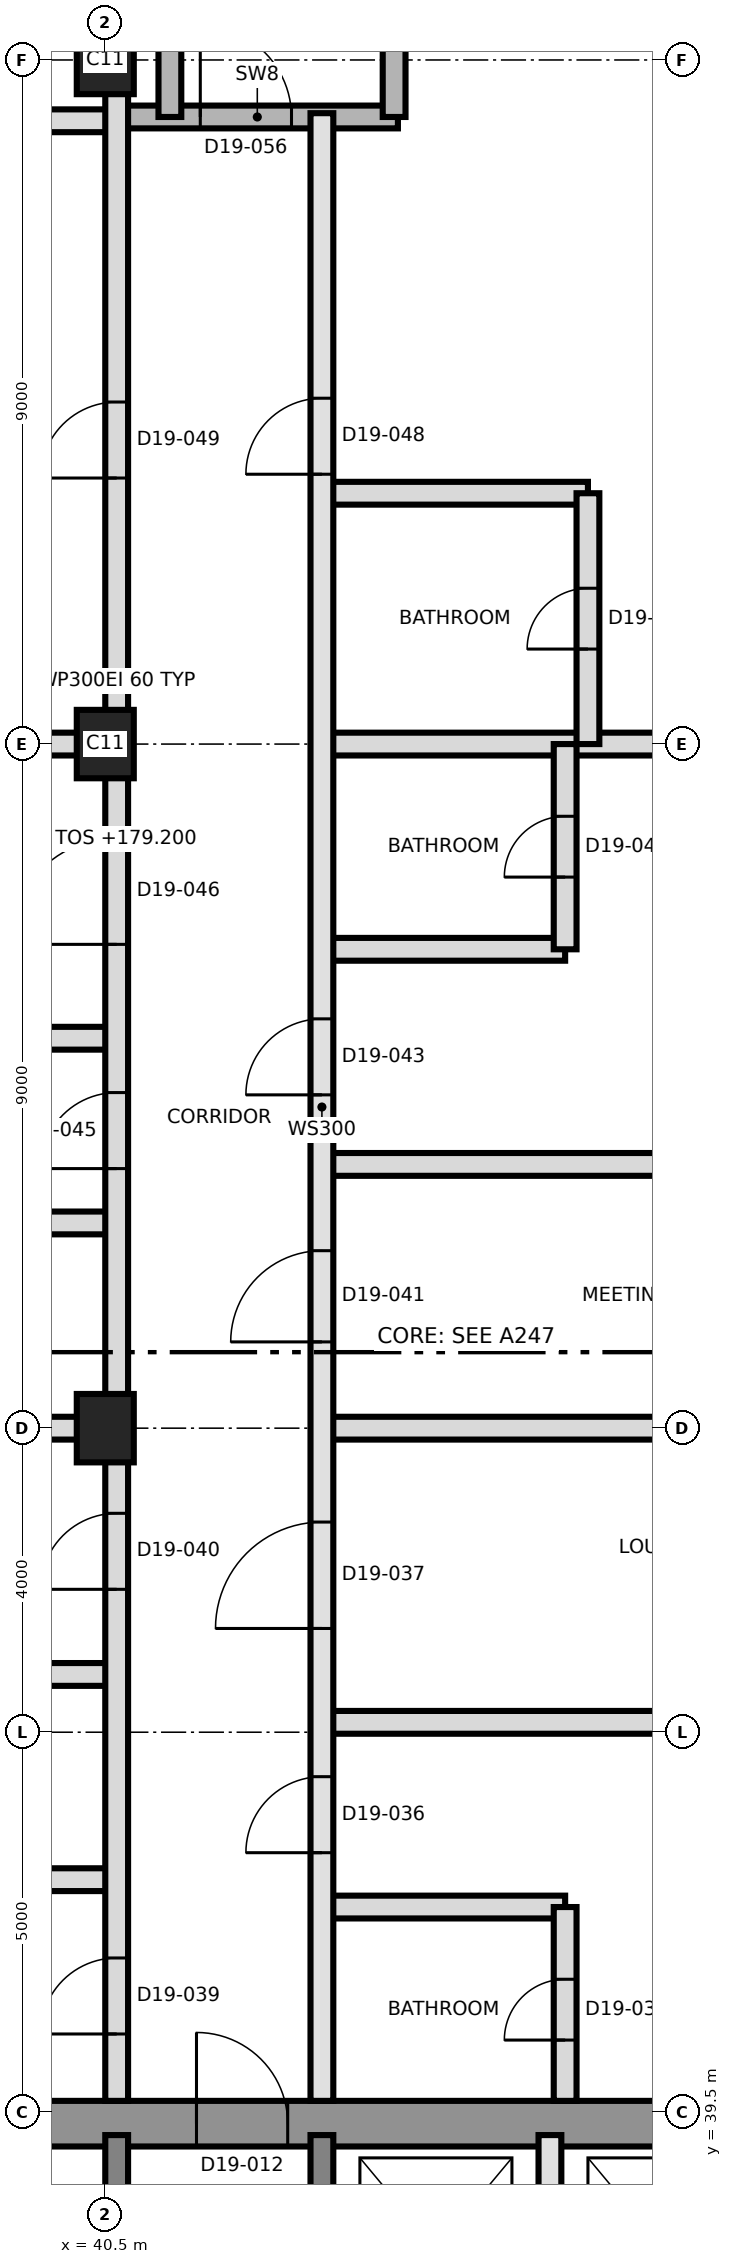
"""IFC4 building model, lengths in metres.
Left out: names, types, materials, properties, quantities, classifications, styles, units other than length and angle.
Written with IfcOpenShell. Run it as: python <this file> out.ifc"""

import sys

from ifc_helpers import new_model, si_unit, direction, frame, frame_2d, origin, origin_2d, place, context, subcontext, project, spatial, rectangle, extrude, element, fill, save


model = new_model("IFC4")
c1 = context("Model", 3, precision=1e-05, world=origin(), true_north=direction((0.0, 1.0)))
c2 = subcontext(c1, "Body", "Model", "MODEL_VIEW")
j1 = project(units=[si_unit("LENGTHUNIT", "METRE"), si_unit("PLANEANGLEUNIT", "RADIAN")], contexts=[c1])
p1 = place(None, origin())
s1 = spatial("IfcSite", under=j1, at=p1, CompositionType="ELEMENT")
p2 = place(p1, origin())
s2 = spatial("IfcBuilding", under=s1, at=p2, CompositionType="ELEMENT")
p3 = place(p2, frame((0.0, 0.0, 179.2)))
s3 = spatial("IfcBuildingStorey", under=s2, at=p3, CompositionType="ELEMENT", Elevation=179.2)
p4 = place(p3, frame((31.2, 39.35, 0.0), z_axis=(0.0, 0.0, 1.0), x_axis=(1.0, 0.0, 0.0)))
e1 = element("IfcWall", 1, at=p4, inside=s3, PredefinedType="SHEAR", context=c2, shape_type="SweptSolid", body=[
    extrude(rectangle(XDim=27.0, YDim=0.6, at=frame_2d((13.5, 0.0))), origin(), (0.0, 0.0, 1.0), 3.7),
])
p5 = place(p4, frame((10.5, 0.0, 0.0)))
e2 = element("IfcOpeningElement", 2, at=p5, cuts=e1, PredefinedType="OPENING", context=c2, shape_type="SweptSolid", body=[
    extrude(rectangle(XDim=1.2, YDim=2.1, at=frame_2d((0.6, 1.05))), frame((0.0, 0.31, 0.0), z_axis=(0.0, -1.0, 0.0), x_axis=(1.0, 0.0, 0.0)), (0.0, 0.0, 1.0), 0.62),
])
for number, where, z_axis, x_axis in (
    (3, (40.65, 33.5, 0.0), (0.0, 0.0, 1.0), (0.0, 1.0, 0.0)),
    (4, (43.35, 33.5, 0.0), (0.0, 0.0, 1.0), (0.0, 1.0, 0.0)),
):
    element("IfcWall", number, at=place(p3, frame(where, z_axis=z_axis, x_axis=x_axis)), inside=s3, PredefinedType="SHEAR", context=c2, shape_type="SweptSolid", body=[
        extrude(rectangle(XDim=5.7, YDim=0.3, at=frame_2d((2.85, 0.0))), origin(), (0.0, 0.0, 1.0), 3.7),
    ])
for number, where, z_axis, x_axis in (
    (5, (40.5, 48.5, 0.0), (0.0, 0.0, 1.0), (0.0, 1.0, 0.0)),
    (6, (40.5, 57.5, 0.0), (0.0, 0.0, 1.0), (0.0, 1.0, 0.0)),
    (7, (40.5, 66.5, 0.0), (0.0, 0.0, 1.0), (0.0, 1.0, 0.0)),
):
    element("IfcColumn", number, at=place(p3, frame(where, z_axis=z_axis, x_axis=x_axis)), inside=s3, PredefinedType="COLUMN", context=c2, shape_type="SweptSolid", body=[
        extrude(rectangle(XDim=0.9, YDim=0.75, at=origin_2d()), origin(), (0.0, 0.0, 1.0), 3.7),
    ])
p6 = place(p3, frame((46.35, 36.2, 0.0), z_axis=(0.0, 0.0, 1.0), x_axis=(0.0, 1.0, 0.0)))
e8 = element("IfcWall", 8, at=p6, inside=s3, PredefinedType="SOLIDWALL", context=c2, shape_type="SweptSolid", body=[
    extrude(rectangle(XDim=3.0, YDim=0.3, at=frame_2d((1.5, 0.0))), origin(), (0.0, 0.0, 1.0), 3.4),
])
for number, where, z_axis, x_axis in (
    (9, (43.35, 42.2, 0.0), (0.0, 0.0, 1.0), (1.0, 0.0, 0.0)),
    (10, (37.45, 42.56, 0.0), (0.0, 0.0, 1.0), (1.0, 0.0, 0.0)),
):
    element("IfcWall", number, at=place(p3, frame(where, z_axis=z_axis, x_axis=x_axis)), inside=s3, PredefinedType="PARTITIONING", context=c2, shape_type="SweptSolid", body=[
        extrude(rectangle(XDim=3.2, YDim=0.3, at=frame_2d((1.6, 0.0))), origin(), (0.0, 0.0, 1.0), 3.4),
    ])
p7 = place(p3, frame((43.35, 44.63, 0.0), z_axis=(0.0, 0.0, 1.0), x_axis=(1.0, 0.0, 0.0)))
e11 = element("IfcWall", 11, at=p7, inside=s3, PredefinedType="PARTITIONING", context=c2, shape_type="SweptSolid", body=[
    extrude(rectangle(XDim=8.95, YDim=0.3, at=frame_2d((4.475, 0.0))), origin(), (0.0, 0.0, 1.0), 3.4),
])
for number, where, z_axis, x_axis in (
    (12, (29.17, 45.26, 0.0), (0.0, 0.0, 1.0), (1.0, 0.0, 0.0)),
    (13, (29.17, 48.5, 0.0), (0.0, 0.0, 1.0), (1.0, 0.0, 0.0)),
):
    element("IfcWall", number, at=place(p3, frame(where, z_axis=z_axis, x_axis=x_axis)), inside=s3, PredefinedType="PARTITIONING", context=c2, shape_type="SweptSolid", body=[
        extrude(rectangle(XDim=11.48, YDim=0.3, at=frame_2d((5.74, 0.0))), origin(), (0.0, 0.0, 1.0), 3.4),
    ])
p8 = place(p3, frame((43.35, 48.5, 0.0), z_axis=(0.0, 0.0, 1.0), x_axis=(1.0, 0.0, 0.0)))
e14 = element("IfcWall", 14, at=p8, inside=s3, PredefinedType="PARTITIONING", context=c2, shape_type="SweptSolid", body=[
    extrude(rectangle(XDim=8.66, YDim=0.3, at=frame_2d((4.33, 0.0))), origin(), (0.0, 0.0, 1.0), 3.4),
])
p9 = place(p3, frame((37.45, 51.2, 0.0), z_axis=(0.0, 0.0, 1.0), x_axis=(1.0, 0.0, 0.0)))
e15 = element("IfcWall", 15, at=p9, inside=s3, PredefinedType="PARTITIONING", context=c2, shape_type="SweptSolid", body=[
    extrude(rectangle(XDim=3.2, YDim=0.3, at=frame_2d((1.6, 0.0))), origin(), (0.0, 0.0, 1.0), 3.4),
])
p10 = place(p3, frame((43.35, 51.97, 0.0), z_axis=(0.0, 0.0, 1.0), x_axis=(1.0, 0.0, 0.0)))
e16 = element("IfcWall", 16, at=p10, inside=s3, PredefinedType="PARTITIONING", context=c2, shape_type="SweptSolid", body=[
    extrude(rectangle(XDim=8.66, YDim=0.3, at=frame_2d((4.33, 0.0))), origin(), (0.0, 0.0, 1.0), 3.4),
])
p11 = place(p3, frame((29.17, 53.63, 0.0), z_axis=(0.0, 0.0, 1.0), x_axis=(1.0, 0.0, 0.0)))
e17 = element("IfcWall", 17, at=p11, inside=s3, PredefinedType="PARTITIONING", context=c2, shape_type="SweptSolid", body=[
    extrude(rectangle(XDim=11.48, YDim=0.3, at=frame_2d((5.74, 0.0))), origin(), (0.0, 0.0, 1.0), 3.4),
])
p12 = place(p3, frame((43.35, 54.8, 0.0), z_axis=(0.0, 0.0, 1.0), x_axis=(1.0, 0.0, 0.0)))
e18 = element("IfcWall", 18, at=p12, inside=s3, PredefinedType="PARTITIONING", context=c2, shape_type="SweptSolid", body=[
    extrude(rectangle(XDim=3.2, YDim=0.3, at=frame_2d((1.6, 0.0))), origin(), (0.0, 0.0, 1.0), 3.4),
])
p13 = place(p3, frame((29.17, 57.5, 0.0), z_axis=(0.0, 0.0, 1.0), x_axis=(1.0, 0.0, 0.0)))
e19 = element("IfcWall", 19, at=p13, inside=s3, PredefinedType="PARTITIONING", context=c2, shape_type="SweptSolid", body=[
    extrude(rectangle(XDim=11.48, YDim=0.3, at=frame_2d((5.74, 0.0))), origin(), (0.0, 0.0, 1.0), 3.4),
])
p14 = place(p3, frame((43.35, 57.5, 0.0), z_axis=(0.0, 0.0, 1.0), x_axis=(1.0, 0.0, 0.0)))
e20 = element("IfcWall", 20, at=p14, inside=s3, PredefinedType="PARTITIONING", context=c2, shape_type="SweptSolid", body=[
    extrude(rectangle(XDim=8.66, YDim=0.3, at=frame_2d((4.33, 0.0))), origin(), (0.0, 0.0, 1.0), 3.4),
])
p15 = place(p3, frame((43.35, 60.8, 0.0), z_axis=(0.0, 0.0, 1.0), x_axis=(1.0, 0.0, 0.0)))
e21 = element("IfcWall", 21, at=p15, inside=s3, PredefinedType="PARTITIONING", context=c2, shape_type="SweptSolid", body=[
    extrude(rectangle(XDim=3.5, YDim=0.3, at=frame_2d((1.75, 0.0))), origin(), (0.0, 0.0, 1.0), 3.4),
])
p16 = place(p3, frame((29.17, 65.7, 0.0), z_axis=(0.0, 0.0, 1.0), x_axis=(1.0, 0.0, 0.0)))
e22 = element("IfcWall", 22, at=p16, inside=s3, PredefinedType="PARTITIONING", context=c2, shape_type="SweptSolid", body=[
    extrude(rectangle(XDim=11.48, YDim=0.3, at=frame_2d((5.74, 0.0))), origin(), (0.0, 0.0, 1.0), 3.4),
])
p17 = place(p16, frame((5.83, 0.0, 0.0)))
e23 = element("IfcOpeningElement", 23, at=p17, cuts=e22, PredefinedType="OPENING", context=c2, shape_type="SweptSolid", body=[
    extrude(rectangle(XDim=1.0, YDim=2.1, at=frame_2d((0.5, 1.05))), frame((0.0, 0.16, 0.0), z_axis=(0.0, -1.0, 0.0), x_axis=(1.0, 0.0, 0.0)), (0.0, 0.0, 1.0), 0.32),
])
p18 = place(p3, frame((40.65, 65.75, 0.0), z_axis=(0.0, 0.0, 1.0), x_axis=(1.0, 0.0, 0.0)))
e24 = element("IfcWall", 24, at=p18, inside=s3, PredefinedType="SHEAR", context=c2, shape_type="SweptSolid", body=[
    extrude(rectangle(XDim=3.7, YDim=0.3, at=frame_2d((1.85, 0.0))), origin(), (0.0, 0.0, 1.0), 3.4),
])
p19 = place(p18, frame((1.1, 0.0, 0.0)))
e25 = element("IfcOpeningElement", 25, at=p19, cuts=e24, PredefinedType="OPENING", context=c2, shape_type="SweptSolid", body=[
    extrude(rectangle(XDim=1.2, YDim=2.1, at=frame_2d((0.6, 1.05))), frame((0.0, 0.16, 0.0), z_axis=(0.0, -1.0, 0.0), x_axis=(1.0, 0.0, 0.0)), (0.0, 0.0, 1.0), 0.32),
])
p20 = place(p3, frame((40.65, 39.65, 0.0), z_axis=(0.0, 0.0, 1.0), x_axis=(0.0, 1.0, 0.0)))
e26 = element("IfcWall", 26, at=p20, inside=s3, PredefinedType="PARTITIONING", context=c2, shape_type="SweptSolid", body=[
    extrude(rectangle(XDim=37.35, YDim=0.3, at=frame_2d((18.675, 0.0))), origin(), (0.0, 0.0, 1.0), 3.4),
])
p21 = place(p20, frame((0.88, 0.0, 0.0)))
e27 = element("IfcOpeningElement", 27, at=p21, cuts=e26, PredefinedType="OPENING", context=c2, shape_type="SweptSolid", body=[
    extrude(rectangle(XDim=1.0, YDim=2.1, at=frame_2d((0.5, 1.05))), frame((0.0, 0.16, 0.0), z_axis=(0.0, -1.0, 0.0), x_axis=(1.0, 0.0, 0.0)), (0.0, 0.0, 1.0), 0.32),
])
p22 = place(p20, frame((6.73, 0.0, 0.0)))
e28 = element("IfcOpeningElement", 28, at=p22, cuts=e26, PredefinedType="OPENING", context=c2, shape_type="SweptSolid", body=[
    extrude(rectangle(XDim=1.0, YDim=2.1, at=frame_2d((0.5, 1.05))), frame((0.0, 0.16, 0.0), z_axis=(0.0, -1.0, 0.0), x_axis=(1.0, 0.0, 0.0)), (0.0, 0.0, 1.0), 0.32),
])
p23 = place(p20, frame((12.265, 0.0, 0.0)))
e29 = element("IfcOpeningElement", 29, at=p23, cuts=e26, PredefinedType="OPENING", context=c2, shape_type="SweptSolid", body=[
    extrude(rectangle(XDim=1.0, YDim=2.1, at=frame_2d((0.5, 1.05))), frame((0.0, 0.16, 0.0), z_axis=(0.0, -1.0, 0.0), x_axis=(1.0, 0.0, 0.0)), (0.0, 0.0, 1.0), 0.32),
])
p24 = place(p20, frame((15.215, 0.0, 0.0)))
e30 = element("IfcOpeningElement", 30, at=p24, cuts=e26, PredefinedType="OPENING", context=c2, shape_type="SweptSolid", body=[
    extrude(rectangle(XDim=1.4, YDim=2.1, at=frame_2d((0.7, 1.05))), frame((0.0, 0.16, 0.0), z_axis=(0.0, -1.0, 0.0), x_axis=(1.0, 0.0, 0.0)), (0.0, 0.0, 1.0), 0.32),
])
p25 = place(p20, frame((21.35, 0.0, 0.0)))
e31 = element("IfcOpeningElement", 31, at=p25, cuts=e26, PredefinedType="OPENING", context=c2, shape_type="SweptSolid", body=[
    extrude(rectangle(XDim=1.0, YDim=2.4, at=frame_2d((0.5, 1.2))), frame((0.0, 0.16, 0.0), z_axis=(0.0, -1.0, 0.0), x_axis=(1.0, 0.0, 0.0)), (0.0, 0.0, 1.0), 0.32),
])
p26 = place(p3, frame((41.35, 65.75, 0.0), z_axis=(0.0, 0.0, 1.0), x_axis=(0.0, 1.0, 0.0)))
e32 = element("IfcWall", 32, at=p26, inside=s3, PredefinedType="SHEAR", context=c2, shape_type="SweptSolid", body=[
    extrude(rectangle(XDim=8.85, YDim=0.3, at=frame_2d((4.425, 0.0))), origin(), (0.0, 0.0, 1.0), 3.4),
])
p27 = place(p3, frame((43.35, 39.65, 0.0), z_axis=(0.0, 0.0, 1.0), x_axis=(0.0, 1.0, 0.0)))
e33 = element("IfcWall", 33, at=p27, inside=s3, PredefinedType="SOLIDWALL", context=c2, shape_type="SweptSolid", body=[
    extrude(rectangle(XDim=26.15, YDim=0.3, at=frame_2d((13.075, 0.0))), origin(), (0.0, 0.0, 1.0), 3.4),
])
p28 = place(p27, frame((3.265, 0.0, 0.0)))
e34 = element("IfcOpeningElement", 34, at=p28, cuts=e33, PredefinedType="OPENING", context=c2, shape_type="SweptSolid", body=[
    extrude(rectangle(XDim=1.0, YDim=2.1, at=frame_2d((0.5, 1.05))), frame((0.0, 0.16, 0.0), z_axis=(0.0, -1.0, 0.0), x_axis=(1.0, 0.0, 0.0)), (0.0, 0.0, 1.0), 0.32),
])
p29 = place(p27, frame((6.215, 0.0, 0.0)))
e35 = element("IfcOpeningElement", 35, at=p29, cuts=e33, PredefinedType="OPENING", context=c2, shape_type="SweptSolid", body=[
    extrude(rectangle(XDim=1.4, YDim=2.1, at=frame_2d((0.7, 1.05))), frame((0.0, 0.16, 0.0), z_axis=(0.0, -1.0, 0.0), x_axis=(1.0, 0.0, 0.0)), (0.0, 0.0, 1.0), 0.32),
])
p30 = place(p27, frame((9.985, 0.0, 0.0)))
e36 = element("IfcOpeningElement", 36, at=p30, cuts=e33, PredefinedType="OPENING", context=c2, shape_type="SweptSolid", body=[
    extrude(rectangle(XDim=1.2, YDim=2.1, at=frame_2d((0.6, 1.05))), frame((0.0, 0.16, 0.0), z_axis=(0.0, -1.0, 0.0), x_axis=(1.0, 0.0, 0.0)), (0.0, 0.0, 1.0), 0.32),
])
p31 = place(p27, frame((13.235, 0.0, 0.0)))
e37 = element("IfcOpeningElement", 37, at=p31, cuts=e33, PredefinedType="OPENING", context=c2, shape_type="SweptSolid", body=[
    extrude(rectangle(XDim=1.0, YDim=2.1, at=frame_2d((0.5, 1.05))), frame((0.0, 0.16, 0.0), z_axis=(0.0, -1.0, 0.0), x_axis=(1.0, 0.0, 0.0)), (0.0, 0.0, 1.0), 0.32),
])
p32 = place(p27, frame((21.4, 0.0, 0.0)))
e38 = element("IfcOpeningElement", 38, at=p32, cuts=e33, PredefinedType="OPENING", context=c2, shape_type="SweptSolid", body=[
    extrude(rectangle(XDim=1.0, YDim=2.4, at=frame_2d((0.5, 1.2))), frame((0.0, 0.16, 0.0), z_axis=(0.0, -1.0, 0.0), x_axis=(1.0, 0.0, 0.0)), (0.0, 0.0, 1.0), 0.32),
])
p33 = place(p3, frame((44.3, 65.75, 0.0), z_axis=(0.0, 0.0, 1.0), x_axis=(0.0, 1.0, 0.0)))
e39 = element("IfcWall", 39, at=p33, inside=s3, PredefinedType="SHEAR", context=c2, shape_type="SweptSolid", body=[
    extrude(rectangle(XDim=8.85, YDim=0.3, at=frame_2d((4.425, 0.0))), origin(), (0.0, 0.0, 1.0), 3.4),
])
p34 = place(p3, frame((46.55, 39.65, 0.0), z_axis=(0.0, 0.0, 1.0), x_axis=(0.0, 1.0, 0.0)))
e40 = element("IfcWall", 40, at=p34, inside=s3, PredefinedType="PARTITIONING", context=c2, shape_type="SweptSolid", body=[
    extrude(rectangle(XDim=2.55, YDim=0.3, at=frame_2d((1.275, 0.0))), origin(), (0.0, 0.0, 1.0), 3.4),
])
p35 = place(p34, frame((0.8, 0.0, 0.0)))
e41 = element("IfcOpeningElement", 41, at=p35, cuts=e40, PredefinedType="OPENING", context=c2, shape_type="SweptSolid", body=[
    extrude(rectangle(XDim=0.8, YDim=2.1, at=frame_2d((0.4, 1.05))), frame((0.0, 0.16, 0.0), z_axis=(0.0, -1.0, 0.0), x_axis=(1.0, 0.0, 0.0)), (0.0, 0.0, 1.0), 0.32),
])
p36 = place(p3, frame((46.55, 54.8, 0.0), z_axis=(0.0, 0.0, 1.0), x_axis=(0.0, 1.0, 0.0)))
e42 = element("IfcWall", 42, at=p36, inside=s3, PredefinedType="PARTITIONING", context=c2, shape_type="SweptSolid", body=[
    extrude(rectangle(XDim=2.7, YDim=0.3, at=frame_2d((1.35, 0.0))), origin(), (0.0, 0.0, 1.0), 3.4),
])
p37 = place(p36, frame((0.95, 0.0, 0.0)))
e43 = element("IfcOpeningElement", 43, at=p37, cuts=e42, PredefinedType="OPENING", context=c2, shape_type="SweptSolid", body=[
    extrude(rectangle(XDim=0.8, YDim=2.1, at=frame_2d((0.4, 1.05))), frame((0.0, 0.16, 0.0), z_axis=(0.0, -1.0, 0.0), x_axis=(1.0, 0.0, 0.0)), (0.0, 0.0, 1.0), 0.32),
])
p38 = place(p3, frame((46.85, 57.5, 0.0), z_axis=(0.0, 0.0, 1.0), x_axis=(0.0, 1.0, 0.0)))
e44 = element("IfcWall", 44, at=p38, inside=s3, PredefinedType="PARTITIONING", context=c2, shape_type="SweptSolid", body=[
    extrude(rectangle(XDim=3.3, YDim=0.3, at=frame_2d((1.65, 0.0))), origin(), (0.0, 0.0, 1.0), 3.4),
])
p39 = place(p38, frame((1.25, 0.0, 0.0)))
e45 = element("IfcOpeningElement", 45, at=p39, cuts=e44, PredefinedType="OPENING", context=c2, shape_type="SweptSolid", body=[
    extrude(rectangle(XDim=0.8, YDim=2.1, at=frame_2d((0.4, 1.05))), frame((0.0, 0.16, 0.0), z_axis=(0.0, -1.0, 0.0), x_axis=(1.0, 0.0, 0.0)), (0.0, 0.0, 1.0), 0.32),
])
p40 = place(p5, origin())
e46 = element("IfcDoor", 46, at=p40, inside=s3, OperationType="SINGLE_SWING_RIGHT", PredefinedType="DOOR", context=c2, shape_type="SweptSolid", body=[
    extrude(rectangle(XDim=1.2, YDim=2.1, at=frame_2d((0.6, 1.05))), frame((0.0, 0.025, 0.0), z_axis=(0.0, -1.0, 0.0), x_axis=(1.0, 0.0, 0.0)), (0.0, 0.0, 1.0), 0.05),
])
fill(e2, e46)
p41 = place(p35, origin())
e47 = element("IfcDoor", 47, at=p41, inside=s3, OperationType="SINGLE_SWING_LEFT", PredefinedType="DOOR", context=c2, shape_type="SweptSolid", body=[
    extrude(rectangle(XDim=0.8, YDim=2.1, at=frame_2d((0.4, 1.05))), frame((0.0, 0.025, 0.0), z_axis=(0.0, -1.0, 0.0), x_axis=(1.0, 0.0, 0.0)), (0.0, 0.0, 1.0), 0.05),
])
fill(e41, e47)
p42 = place(p28, origin())
e48 = element("IfcDoor", 48, at=p42, inside=s3, OperationType="SINGLE_SWING_RIGHT", PredefinedType="DOOR", context=c2, shape_type="SweptSolid", body=[
    extrude(rectangle(XDim=1.0, YDim=2.1, at=frame_2d((0.5, 1.05))), frame((0.0, 0.025, 0.0), z_axis=(0.0, -1.0, 0.0), x_axis=(1.0, 0.0, 0.0)), (0.0, 0.0, 1.0), 0.05),
])
fill(e34, e48)
p43 = place(p29, origin())
e49 = element("IfcDoor", 49, at=p43, inside=s3, OperationType="SINGLE_SWING_LEFT", PredefinedType="DOOR", context=c2, shape_type="SweptSolid", body=[
    extrude(rectangle(XDim=1.4, YDim=2.1, at=frame_2d((0.7, 1.05))), frame((0.0, 0.025, 0.0), z_axis=(0.0, -1.0, 0.0), x_axis=(1.0, 0.0, 0.0)), (0.0, 0.0, 1.0), 0.05),
])
fill(e35, e49)
p44 = place(p21, origin())
e50 = element("IfcDoor", 50, at=p44, inside=s3, OperationType="SINGLE_SWING_RIGHT", PredefinedType="DOOR", context=c2, shape_type="SweptSolid", body=[
    extrude(rectangle(XDim=1.0, YDim=2.1, at=frame_2d((0.5, 1.05))), frame((0.0, 0.025, 0.0), z_axis=(0.0, -1.0, 0.0), x_axis=(1.0, 0.0, 0.0)), (0.0, 0.0, 1.0), 0.05),
])
fill(e27, e50)
p45 = place(p22, origin())
e51 = element("IfcDoor", 51, at=p45, inside=s3, OperationType="SINGLE_SWING_LEFT", PredefinedType="DOOR", context=c2, shape_type="SweptSolid", body=[
    extrude(rectangle(XDim=1.0, YDim=2.1, at=frame_2d((0.5, 1.05))), frame((0.0, 0.025, 0.0), z_axis=(0.0, -1.0, 0.0), x_axis=(1.0, 0.0, 0.0)), (0.0, 0.0, 1.0), 0.05),
])
fill(e28, e51)
p46 = place(p30, origin())
e52 = element("IfcDoor", 52, at=p46, inside=s3, OperationType="SINGLE_SWING_RIGHT", PredefinedType="DOOR", context=c2, shape_type="SweptSolid", body=[
    extrude(rectangle(XDim=1.2, YDim=2.1, at=frame_2d((0.6, 1.05))), frame((0.0, 0.025, 0.0), z_axis=(0.0, -1.0, 0.0), x_axis=(1.0, 0.0, 0.0)), (0.0, 0.0, 1.0), 0.05),
])
fill(e36, e52)
p47 = place(p37, origin())
e53 = element("IfcDoor", 53, at=p47, inside=s3, OperationType="SINGLE_SWING_LEFT", PredefinedType="DOOR", context=c2, shape_type="SweptSolid", body=[
    extrude(rectangle(XDim=0.8, YDim=2.1, at=frame_2d((0.4, 1.05))), frame((0.0, 0.025, 0.0), z_axis=(0.0, -1.0, 0.0), x_axis=(1.0, 0.0, 0.0)), (0.0, 0.0, 1.0), 0.05),
])
fill(e43, e53)
p48 = place(p31, origin())
e54 = element("IfcDoor", 54, at=p48, inside=s3, OperationType="SINGLE_SWING_LEFT", PredefinedType="DOOR", context=c2, shape_type="SweptSolid", body=[
    extrude(rectangle(XDim=1.0, YDim=2.1, at=frame_2d((0.5, 1.05))), frame((0.0, 0.025, 0.0), z_axis=(0.0, -1.0, 0.0), x_axis=(1.0, 0.0, 0.0)), (0.0, 0.0, 1.0), 0.05),
])
fill(e37, e54)
p49 = place(p23, origin())
e55 = element("IfcDoor", 55, at=p49, inside=s3, OperationType="SINGLE_SWING_RIGHT", PredefinedType="DOOR", context=c2, shape_type="SweptSolid", body=[
    extrude(rectangle(XDim=1.0, YDim=2.1, at=frame_2d((0.5, 1.05))), frame((0.0, 0.025, 0.0), z_axis=(0.0, -1.0, 0.0), x_axis=(1.0, 0.0, 0.0)), (0.0, 0.0, 1.0), 0.05),
])
fill(e29, e55)
p50 = place(p24, origin())
e56 = element("IfcDoor", 56, at=p50, inside=s3, OperationType="SINGLE_SWING_LEFT", PredefinedType="DOOR", context=c2, shape_type="SweptSolid", body=[
    extrude(rectangle(XDim=1.4, YDim=2.1, at=frame_2d((0.7, 1.05))), frame((0.0, 0.025, 0.0), z_axis=(0.0, -1.0, 0.0), x_axis=(1.0, 0.0, 0.0)), (0.0, 0.0, 1.0), 0.05),
])
fill(e30, e56)
p51 = place(p39, origin())
e57 = element("IfcDoor", 57, at=p51, inside=s3, OperationType="SINGLE_SWING_LEFT", PredefinedType="DOOR", context=c2, shape_type="SweptSolid", body=[
    extrude(rectangle(XDim=0.8, YDim=2.1, at=frame_2d((0.4, 1.05))), frame((0.0, 0.025, 0.0), z_axis=(0.0, -1.0, 0.0), x_axis=(1.0, 0.0, 0.0)), (0.0, 0.0, 1.0), 0.05),
])
fill(e45, e57)
p52 = place(p32, origin())
e58 = element("IfcDoor", 58, at=p52, inside=s3, OperationType="SINGLE_SWING_RIGHT", PredefinedType="DOOR", context=c2, shape_type="SweptSolid", body=[
    extrude(rectangle(XDim=1.0, YDim=2.4, at=frame_2d((0.5, 1.2))), frame((0.0, 0.025, 0.0), z_axis=(0.0, -1.0, 0.0), x_axis=(1.0, 0.0, 0.0)), (0.0, 0.0, 1.0), 0.05),
])
fill(e38, e58)
p53 = place(p25, origin())
e59 = element("IfcDoor", 59, at=p53, inside=s3, OperationType="SINGLE_SWING_LEFT", PredefinedType="DOOR", context=c2, shape_type="SweptSolid", body=[
    extrude(rectangle(XDim=1.0, YDim=2.4, at=frame_2d((0.5, 1.2))), frame((0.0, 0.025, 0.0), z_axis=(0.0, -1.0, 0.0), x_axis=(1.0, 0.0, 0.0)), (0.0, 0.0, 1.0), 0.05),
])
fill(e31, e59)
p54 = place(p19, origin())
e60 = element("IfcDoor", 60, at=p54, inside=s3, OperationType="SINGLE_SWING_RIGHT", PredefinedType="DOOR", context=c2, shape_type="SweptSolid", body=[
    extrude(rectangle(XDim=1.2, YDim=2.1, at=frame_2d((0.6, 1.05))), frame((0.0, 0.025, 0.0), z_axis=(0.0, -1.0, 0.0), x_axis=(1.0, 0.0, 0.0)), (0.0, 0.0, 1.0), 0.05),
])
fill(e25, e60)
save(model, sys.argv[1])
